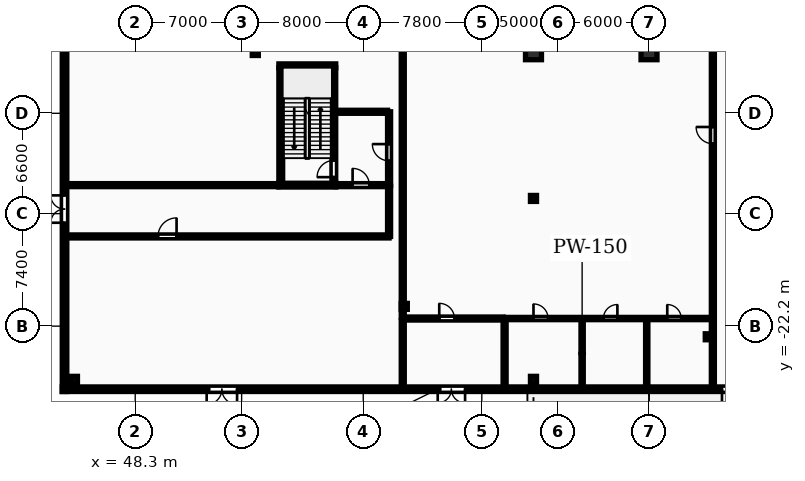
"""IFC4 building model, lengths in metres.
Left out: names, types, materials, properties, quantities, classifications, styles, units other than length and angle.
Written with IfcOpenShell. Run it as: python <this file> out.ifc"""

import sys

from ifc_helpers import new_model, si_unit, direction, frame, frame_2d, origin, origin_2d, place, context, subcontext, project, spatial, rectangle, i_section, extrude, element, fill, save


model = new_model("IFC4")
c1 = context("Model", 3, precision=1e-05, world=origin(), true_north=direction((0.0, 1.0)))
c2 = subcontext(c1, "Body", "Model", "MODEL_VIEW")
j1 = project(units=[si_unit("LENGTHUNIT", "METRE"), si_unit("PLANEANGLEUNIT", "RADIAN")], contexts=[c1])
p1 = place(None, origin())
s1 = spatial("IfcSite", under=j1, at=p1, CompositionType="ELEMENT")
p2 = place(p1, origin())
s2 = spatial("IfcBuilding", under=s1, at=p2, CompositionType="ELEMENT")
p3 = place(p2, origin())
s3 = spatial("IfcBuildingStorey", under=s2, at=p3, CompositionType="ELEMENT", Elevation=0.0)
for number, where, z_axis, x_axis in (
    (1, (74.5, -4.2, 0.0), (0.0, 0.0, 1.0), (1.0, 0.0, 0.0)),
    (2, (82.1, -4.2, 0.0), (0.0, 0.0, 1.0), (1.0, 0.0, 0.0)),
):
    element("IfcColumn", number, at=place(p3, frame(where, z_axis=z_axis, x_axis=x_axis)), inside=s3, PredefinedType="COLUMN", context=c2, shape_type="SweptSolid", body=[
        extrude(rectangle(XDim=1.05, YDim=0.95, at=origin_2d()), origin(), (0.0, 0.0, 1.0), 5.4),
    ])
for number, where, z_axis, x_axis in (
    (3, (56.2, -4.2, 0.0), (0.0, 0.0, 1.0), (1.0, 0.0, 0.0)),
    (4, (74.5, -13.8, 0.0), (0.0, 0.0, 1.0), (1.0, 0.0, 0.0)),
    (5, (86.0, -22.9, 0.0), (0.0, 0.0, 1.0), (1.0, 0.0, 0.0)),
    (6, (66.0, -20.9, 0.0), (0.0, 0.0, 1.0), (1.0, 0.0, 0.0)),
    (7, (44.3, -25.7, 0.0), (0.0, 0.0, 1.0), (1.0, 0.0, 0.0)),
    (8, (74.5, -25.7, 0.0), (0.0, 0.0, 1.0), (1.0, 0.0, 0.0)),
):
    element("IfcColumn", number, at=place(p3, frame(where, z_axis=z_axis, x_axis=x_axis)), inside=s3, PredefinedType="COLUMN", context=c2, shape_type="SweptSolid", body=[
        extrude(i_section(OverallWidth=0.399, OverallDepth=0.394, WebThickness=0.023, FlangeThickness=0.037, FilletRadius=0.015, at=origin_2d()), origin(), (0.0, 0.0, 1.0), 5.4),
    ])
p4 = place(p3, frame((43.5, -26.35, 0.0), z_axis=(0.0, 0.0, 1.0), x_axis=(1.0, 0.0, 0.0)))
e9 = element("IfcWall", 9, at=p4, inside=s3, PredefinedType="STANDARD", context=c2, shape_type="SweptSolid", body=[
    extrude(rectangle(XDim=46.0, YDim=0.3, at=frame_2d((23.0, 0.0))), origin(), (0.0, 0.0, 1.0), 5.1),
])
p5 = place(p4, frame((9.5, 0.0, 0.0)))
e10 = element("IfcOpeningElement", 10, at=p5, cuts=e9, PredefinedType="OPENING", context=c2, shape_type="SweptSolid", body=[
    extrude(rectangle(XDim=2.0, YDim=2.6, at=frame_2d((1.0, 1.3))), frame((0.0, 0.16, 0.0), z_axis=(0.0, -1.0, 0.0), x_axis=(1.0, 0.0, 0.0)), (0.0, 0.0, 1.0), 0.32),
])
p6 = place(p4, frame((24.7, 0.0, 0.0)))
e11 = element("IfcOpeningElement", 11, at=p6, cuts=e9, PredefinedType="OPENING", context=c2, shape_type="SweptSolid", body=[
    extrude(rectangle(XDim=1.8, YDim=2.2, at=frame_2d((0.9, 1.1))), frame((0.0, 0.16, 0.0), z_axis=(0.0, -1.0, 0.0), x_axis=(1.0, 0.0, 0.0)), (0.0, 0.0, 1.0), 0.32),
])
p7 = place(p4, frame((43.4, 0.0, 0.0)))
e12 = element("IfcOpeningElement", 12, at=p7, cuts=e9, PredefinedType="OPENING", context=c2, shape_type="SweptSolid", body=[
    extrude(rectangle(XDim=1.8, YDim=2.2, at=frame_2d((0.9, 1.1))), frame((0.0, 0.16, 0.0), z_axis=(0.0, -1.0, 0.0), x_axis=(1.0, 0.0, 0.0)), (0.0, 0.0, 1.0), 0.32),
])
p8 = place(p3, frame((43.65, 109.2, 0.0), z_axis=(0.0, 0.0, 1.0), x_axis=(0.0, -1.0, 0.0)))
e13 = element("IfcWall", 13, at=p8, inside=s3, PredefinedType="STANDARD", context=c2, shape_type="SweptSolid", body=[
    extrude(rectangle(XDim=135.7, YDim=0.3, at=frame_2d((67.85, 0.0))), origin(), (0.0, 0.0, 1.0), 5.1),
])
p9 = place(p8, frame((75.1, 0.0, 0.0)))
e14 = element("IfcOpeningElement", 14, at=p9, cuts=e13, PredefinedType="OPENING", context=c2, shape_type="SweptSolid", body=[
    extrude(rectangle(XDim=1.8, YDim=2.2, at=frame_2d((0.9, 1.1))), frame((0.0, 0.16, 0.0), z_axis=(0.0, -1.0, 0.0), x_axis=(1.0, 0.0, 0.0)), (0.0, 0.0, 1.0), 0.32),
])
p10 = place(p8, frame((28.1, 0.0, 0.0)))
e15 = element("IfcOpeningElement", 15, at=p10, cuts=e13, PredefinedType="OPENING", context=c2, shape_type="SweptSolid", body=[
    extrude(rectangle(XDim=1.8, YDim=2.2, at=frame_2d((0.9, 1.1))), frame((0.0, 0.16, 0.0), z_axis=(0.0, -1.0, 0.0), x_axis=(1.0, 0.0, 0.0)), (0.0, 0.0, 1.0), 0.32),
])
p11 = place(p8, frame((36.0, 0.0, 0.0)))
e16 = element("IfcOpeningElement", 16, at=p11, cuts=e13, PredefinedType="OPENING", context=c2, shape_type="SweptSolid", body=[
    extrude(rectangle(XDim=2.0, YDim=2.6, at=frame_2d((1.0, 1.3))), frame((0.0, 0.16, 0.0), z_axis=(0.0, -1.0, 0.0), x_axis=(1.0, 0.0, 0.0)), (0.0, 0.0, 1.0), 0.32),
])
p12 = place(p8, frame((48.0, 0.0, 0.0)))
e17 = element("IfcOpeningElement", 17, at=p12, cuts=e13, PredefinedType="OPENING", context=c2, shape_type="SweptSolid", body=[
    extrude(rectangle(XDim=1.8, YDim=2.2, at=frame_2d((0.9, 1.1))), frame((0.0, 0.16, 0.0), z_axis=(0.0, -1.0, 0.0), x_axis=(1.0, 0.0, 0.0)), (0.0, 0.0, 1.0), 0.32),
])
p13 = place(p8, frame((122.8, 0.0, 0.0)))
e18 = element("IfcOpeningElement", 18, at=p13, cuts=e13, PredefinedType="OPENING", context=c2, shape_type="SweptSolid", body=[
    extrude(rectangle(XDim=1.8, YDim=2.2, at=frame_2d((0.9, 1.1))), frame((0.0, 0.16, 0.0), z_axis=(0.0, -1.0, 0.0), x_axis=(1.0, 0.0, 0.0)), (0.0, 0.0, 1.0), 0.32),
])
p14 = place(p3, frame((57.875, -12.8, 0.0), z_axis=(0.0, 0.0, 1.0), x_axis=(0.0, 1.0, 0.0)))
e19 = element("IfcWall", 19, at=p14, inside=s3, PredefinedType="SHEAR", context=c2, shape_type="SweptSolid", body=[
    extrude(rectangle(XDim=7.6, YDim=0.25, at=frame_2d((3.8, 0.0))), origin(), (0.0, 0.0, 1.0), 5.4),
])
for number, where, z_axis, x_axis in (
    (20, (57.75, -12.925, 0.0), (0.0, 0.0, 1.0), (1.0, 0.0, 0.0)),
    (21, (57.75, -5.075, 0.0), (0.0, 0.0, 1.0), (1.0, 0.0, 0.0)),
):
    element("IfcWall", number, at=place(p3, frame(where, z_axis=z_axis, x_axis=x_axis)), inside=s3, PredefinedType="SHEAR", context=c2, shape_type="SweptSolid", body=[
        extrude(rectangle(XDim=3.74, YDim=0.25, at=frame_2d((1.87, 0.0))), origin(), (0.0, 0.0, 1.0), 5.4),
    ])
p15 = place(p3, frame((61.365, -12.8, 0.0), z_axis=(0.0, 0.0, 1.0), x_axis=(0.0, 1.0, 0.0)))
e22 = element("IfcWall", 22, at=p15, inside=s3, PredefinedType="SHEAR", context=c2, shape_type="SweptSolid", body=[
    extrude(rectangle(XDim=7.6, YDim=0.25, at=frame_2d((3.8, 0.0))), origin(), (0.0, 0.0, 1.0), 5.4),
])
p16 = place(p15, frame((0.4, 0.0, 0.0)))
e23 = element("IfcOpeningElement", 23, at=p16, cuts=e22, PredefinedType="OPENING", context=c2, shape_type="SweptSolid", body=[
    extrude(rectangle(XDim=1.1, YDim=2.1, at=frame_2d((0.55, 1.05))), frame((0.0, 0.135, 0.0), z_axis=(0.0, -1.0, 0.0), x_axis=(1.0, 0.0, 0.0)), (0.0, 0.0, 1.0), 0.27),
])
p17 = place(p3, frame((65.0, -12.925, 0.0), z_axis=(0.0, 0.0, 1.0), x_axis=(0.0, 1.0, 0.0)))
e24 = element("IfcWall", 24, at=p17, inside=s3, PredefinedType="PARTITIONING", context=c2, shape_type="SweptSolid", body=[
    extrude(rectangle(XDim=4.825, YDim=0.2, at=frame_2d((2.413, 0.0))), origin(), (0.0, 0.0, 1.0), 5.1),
])
p18 = place(p17, frame((1.6, 0.0, 0.0)))
e25 = element("IfcOpeningElement", 25, at=p18, cuts=e24, PredefinedType="OPENING", context=c2, shape_type="SweptSolid", body=[
    extrude(rectangle(XDim=1.1, YDim=2.15, at=frame_2d((0.55, 1.075))), frame((0.0, 0.11, 0.0), z_axis=(0.0, -1.0, 0.0), x_axis=(1.0, 0.0, 0.0)), (0.0, 0.0, 1.0), 0.22),
])
p19 = place(p3, frame((61.5, -12.925, 0.0), z_axis=(0.0, 0.0, 1.0), x_axis=(1.0, 0.0, 0.0)))
e26 = element("IfcWall", 26, at=p19, inside=s3, PredefinedType="PARTITIONING", context=c2, shape_type="SweptSolid", body=[
    extrude(rectangle(XDim=3.4, YDim=0.2, at=frame_2d((1.7, 0.0))), origin(), (0.0, 0.0, 1.0), 5.1),
])
p20 = place(p19, frame((1.1, 0.0, 0.0)))
e27 = element("IfcOpeningElement", 27, at=p20, cuts=e26, PredefinedType="OPENING", context=c2, shape_type="SweptSolid", body=[
    extrude(rectangle(XDim=1.1, YDim=2.1, at=frame_2d((0.55, 1.05))), frame((0.0, 0.11, 0.0), z_axis=(0.0, -1.0, 0.0), x_axis=(1.0, 0.0, 0.0)), (0.0, 0.0, 1.0), 0.22),
])
p21 = place(p3, frame((61.5, -8.1, 0.0), z_axis=(0.0, 0.0, 1.0), x_axis=(1.0, 0.0, 0.0)))
e28 = element("IfcWall", 28, at=p21, inside=s3, PredefinedType="PARTITIONING", context=c2, shape_type="SweptSolid", body=[
    extrude(rectangle(XDim=3.4, YDim=0.2, at=frame_2d((1.7, 0.0))), origin(), (0.0, 0.0, 1.0), 5.1),
])
p22 = place(p3, frame((65.9, -21.7, 0.0), z_axis=(0.0, 0.0, 1.0), x_axis=(1.0, 0.0, 0.0)))
e29 = element("IfcWall", 29, at=p22, inside=s3, PredefinedType="PARTITIONING", context=c2, shape_type="SweptSolid", body=[
    extrude(rectangle(XDim=6.6, YDim=0.2, at=frame_2d((3.3, 0.0))), origin(), (0.0, 0.0, 1.0), 5.1),
])
p23 = place(p22, frame((2.4, 0.0, 0.0)))
e30 = element("IfcOpeningElement", 30, at=p23, cuts=e29, PredefinedType="OPENING", context=c2, shape_type="SweptSolid", body=[
    extrude(rectangle(XDim=1.0, YDim=2.1, at=frame_2d((0.5, 1.05))), frame((0.0, 0.11, 0.0), z_axis=(0.0, -1.0, 0.0), x_axis=(1.0, 0.0, 0.0)), (0.0, 0.0, 1.0), 0.22),
])
for number, where, z_axis, x_axis in (
    (31, (65.9, -26.2, 0.0), (0.0, 0.0, 1.0), (0.0, 1.0, 0.0)),
    (32, (72.6, -26.2, 0.0), (0.0, 0.0, 1.0), (0.0, 1.0, 0.0)),
):
    element("IfcWall", number, at=place(p3, frame(where, z_axis=z_axis, x_axis=x_axis)), inside=s3, PredefinedType="PARTITIONING", context=c2, shape_type="SweptSolid", body=[
        extrude(rectangle(XDim=4.35, YDim=0.2, at=frame_2d((2.175, 0.0))), origin(), (0.0, 0.0, 1.0), 5.1),
    ])
p24 = place(p3, frame((86.3, -26.2, 0.0), z_axis=(0.0, 0.0, 1.0), x_axis=(0.0, 1.0, 0.0)))
e33 = element("IfcWall", 33, at=p24, inside=s3, PredefinedType="PARTITIONING", context=c2, shape_type="SweptSolid", body=[
    extrude(rectangle(XDim=44.35, YDim=0.2, at=frame_2d((22.175, 0.0))), origin(), (0.0, 0.0, 1.0), 5.1),
])
p25 = place(p24, frame((16.0, 0.0, 0.0)))
e34 = element("IfcOpeningElement", 34, at=p25, cuts=e33, PredefinedType="OPENING", context=c2, shape_type="SweptSolid", body=[
    extrude(rectangle(XDim=1.1, YDim=2.1, at=frame_2d((0.55, 1.05))), frame((0.0, 0.11, 0.0), z_axis=(0.0, -1.0, 0.0), x_axis=(1.0, 0.0, 0.0)), (0.0, 0.0, 1.0), 0.22),
])
p26 = place(p3, frame((43.8, -16.3, 0.0), z_axis=(0.0, 0.0, 1.0), x_axis=(1.0, 0.0, 0.0)))
e35 = element("IfcWall", 35, at=p26, inside=s3, PredefinedType="PARTITIONING", context=c2, shape_type="SweptSolid", body=[
    extrude(rectangle(XDim=21.2, YDim=0.2, at=frame_2d((10.6, 0.0))), origin(), (0.0, 0.0, 1.0), 5.1),
])
p27 = place(p26, frame((6.0, 0.0, 0.0)))
e36 = element("IfcOpeningElement", 36, at=p27, cuts=e35, PredefinedType="OPENING", context=c2, shape_type="SweptSolid", body=[
    extrude(rectangle(XDim=1.22, YDim=2.18, at=frame_2d((0.61, 1.09))), frame((0.0, 0.11, 0.0), z_axis=(0.0, -1.0, 0.0), x_axis=(1.0, 0.0, 0.0)), (0.0, 0.0, 1.0), 0.22),
])
p28 = place(p3, frame((43.8, -12.925, 0.0), z_axis=(0.0, 0.0, 1.0), x_axis=(1.0, 0.0, 0.0)))
e37 = element("IfcWall", 37, at=p28, inside=s3, PredefinedType="PARTITIONING", context=c2, shape_type="SweptSolid", body=[
    extrude(rectangle(XDim=13.9, YDim=0.2, at=frame_2d((6.95, 0.0))), origin(), (0.0, 0.0, 1.0), 5.1),
])
p29 = place(p3, frame((65.0, -16.3, 0.0), z_axis=(0.0, 0.0, 1.0), x_axis=(0.0, 1.0, 0.0)))
e38 = element("IfcWall", 38, at=p29, inside=s3, PredefinedType="PARTITIONING", context=c2, shape_type="SweptSolid", body=[
    extrude(rectangle(XDim=3.3, YDim=0.2, at=frame_2d((1.65, 0.0))), origin(), (0.0, 0.0, 1.0), 5.1),
])
p30 = place(p3, frame((72.7, -21.7, 0.0), z_axis=(0.0, 0.0, 1.0), x_axis=(1.0, 0.0, 0.0)))
e39 = element("IfcWall", 39, at=p30, inside=s3, PredefinedType="PARTITIONING", context=c2, shape_type="SweptSolid", body=[
    extrude(rectangle(XDim=13.5, YDim=0.15, at=frame_2d((6.75, 0.0))), origin(), (0.0, 0.0, 1.0), 5.1),
])
p31 = place(p30, frame((1.8, 0.0, 0.0)))
e40 = element("IfcOpeningElement", 40, at=p31, cuts=e39, PredefinedType="OPENING", context=c2, shape_type="SweptSolid", body=[
    extrude(rectangle(XDim=0.96, YDim=2.1, at=frame_2d((0.48, 1.05))), frame((0.0, 0.085, 0.0), z_axis=(0.0, -1.0, 0.0), x_axis=(1.0, 0.0, 0.0)), (0.0, 0.0, 1.0), 0.17),
])
p32 = place(p30, frame((6.4, 0.0, 0.0)))
e41 = element("IfcOpeningElement", 41, at=p32, cuts=e39, PredefinedType="OPENING", context=c2, shape_type="SweptSolid", body=[
    extrude(rectangle(XDim=0.92, YDim=2.08, at=frame_2d((0.46, 1.04))), frame((0.0, 0.085, 0.0), z_axis=(0.0, -1.0, 0.0), x_axis=(1.0, 0.0, 0.0)), (0.0, 0.0, 1.0), 0.17),
])
p33 = place(p30, frame((10.6, 0.0, 0.0)))
e42 = element("IfcOpeningElement", 42, at=p33, cuts=e39, PredefinedType="OPENING", context=c2, shape_type="SweptSolid", body=[
    extrude(rectangle(XDim=0.92, YDim=2.08, at=frame_2d((0.46, 1.04))), frame((0.0, 0.085, 0.0), z_axis=(0.0, -1.0, 0.0), x_axis=(1.0, 0.0, 0.0)), (0.0, 0.0, 1.0), 0.17),
])
for number, where, z_axis, x_axis in (
    (43, (77.7, -26.2, 0.0), (0.0, 0.0, 1.0), (0.0, 1.0, 0.0)),
    (44, (81.95, -26.2, 0.0), (0.0, 0.0, 1.0), (0.0, 1.0, 0.0)),
):
    element("IfcWall", number, at=place(p3, frame(where, z_axis=z_axis, x_axis=x_axis)), inside=s3, PredefinedType="PARTITIONING", context=c2, shape_type="SweptSolid", body=[
        extrude(rectangle(XDim=4.4, YDim=0.15, at=frame_2d((2.2, 0.0))), origin(), (0.0, 0.0, 1.0), 5.1),
    ])
p34 = place(p3, frame((65.9, -21.6, 0.0), z_axis=(0.0, 0.0, 1.0), x_axis=(0.0, 1.0, 0.0)))
e45 = element("IfcWall", 45, at=p34, inside=s3, PredefinedType="PARTITIONING", context=c2, shape_type="SweptSolid", body=[
    extrude(rectangle(XDim=53.15, YDim=0.2, at=frame_2d((26.575, 0.0))), origin(), (0.0, 0.0, 1.0), 5.1),
])
p35 = place(p34, frame((22.0, 0.0, 0.0)))
e46 = element("IfcOpeningElement", 46, at=p35, cuts=e45, PredefinedType="OPENING", context=c2, shape_type="SweptSolid", body=[
    extrude(rectangle(XDim=1.22, YDim=2.18, at=frame_2d((0.61, 1.09))), frame((0.0, 0.11, 0.0), z_axis=(0.0, -1.0, 0.0), x_axis=(1.0, 0.0, 0.0)), (0.0, 0.0, 1.0), 0.22),
])
p36 = place(p5, frame((2.0, 0.0, 0.0), z_axis=(0.0, 0.0, 1.0), x_axis=(-1.0, 0.0, 0.0)))
e47 = element("IfcDoor", 47, at=p36, inside=s3, OperationType="DOUBLE_DOOR_SINGLE_SWING", PredefinedType="DOOR", context=c2, shape_type="SweptSolid", body=[
    extrude(rectangle(XDim=2.0, YDim=2.6, at=frame_2d((1.0, 1.3))), frame((0.0, 0.025, 0.0), z_axis=(0.0, -1.0, 0.0), x_axis=(1.0, 0.0, 0.0)), (0.0, 0.0, 1.0), 0.05),
])
fill(e10, e47)
p37 = place(p6, frame((1.8, 0.0, 0.0), z_axis=(0.0, 0.0, 1.0), x_axis=(-1.0, 0.0, 0.0)))
e48 = element("IfcDoor", 48, at=p37, inside=s3, OperationType="DOUBLE_DOOR_SINGLE_SWING", PredefinedType="DOOR", context=c2, shape_type="SweptSolid", body=[
    extrude(rectangle(XDim=1.8, YDim=2.2, at=frame_2d((0.9, 1.1))), frame((0.0, 0.025, 0.0), z_axis=(0.0, -1.0, 0.0), x_axis=(1.0, 0.0, 0.0)), (0.0, 0.0, 1.0), 0.05),
])
fill(e11, e48)
p38 = place(p7, frame((1.8, 0.0, 0.0), z_axis=(0.0, 0.0, 1.0), x_axis=(-1.0, 0.0, 0.0)))
e49 = element("IfcDoor", 49, at=p38, inside=s3, OperationType="DOUBLE_DOOR_SINGLE_SWING", PredefinedType="DOOR", context=c2, shape_type="SweptSolid", body=[
    extrude(rectangle(XDim=1.8, YDim=2.2, at=frame_2d((0.9, 1.1))), frame((0.0, 0.025, 0.0), z_axis=(0.0, -1.0, 0.0), x_axis=(1.0, 0.0, 0.0)), (0.0, 0.0, 1.0), 0.05),
])
fill(e12, e49)
p39 = place(p13, frame((1.8, 0.0, 0.0), z_axis=(0.0, 0.0, 1.0), x_axis=(-1.0, 0.0, 0.0)))
e50 = element("IfcDoor", 50, at=p39, inside=s3, OperationType="DOUBLE_DOOR_SINGLE_SWING", PredefinedType="DOOR", context=c2, shape_type="SweptSolid", body=[
    extrude(rectangle(XDim=1.8, YDim=2.2, at=frame_2d((0.9, 1.1))), frame((0.0, 0.025, 0.0), z_axis=(0.0, -1.0, 0.0), x_axis=(1.0, 0.0, 0.0)), (0.0, 0.0, 1.0), 0.05),
])
fill(e18, e50)
p40 = place(p16, origin())
e51 = element("IfcDoor", 51, at=p40, inside=s3, OperationType="SINGLE_SWING_LEFT", PredefinedType="DOOR", context=c2, shape_type="SweptSolid", body=[
    extrude(rectangle(XDim=1.1, YDim=2.1, at=frame_2d((0.55, 1.05))), frame((0.0, 0.025, 0.0), z_axis=(0.0, -1.0, 0.0), x_axis=(1.0, 0.0, 0.0)), (0.0, 0.0, 1.0), 0.05),
])
fill(e23, e51)
p41 = place(p18, origin())
e52 = element("IfcDoor", 52, at=p41, inside=s3, OperationType="SINGLE_SWING_RIGHT", PredefinedType="DOOR", context=c2, shape_type="SweptSolid", body=[
    extrude(rectangle(XDim=1.1, YDim=2.15, at=frame_2d((0.55, 1.075))), frame((0.0, 0.025, 0.0), z_axis=(0.0, -1.0, 0.0), x_axis=(1.0, 0.0, 0.0)), (0.0, 0.0, 1.0), 0.05),
])
fill(e25, e52)
p42 = place(p20, origin())
e53 = element("IfcDoor", 53, at=p42, inside=s3, OperationType="SINGLE_SWING_LEFT", PredefinedType="DOOR", context=c2, shape_type="SweptSolid", body=[
    extrude(rectangle(XDim=1.1, YDim=2.1, at=frame_2d((0.55, 1.05))), frame((0.0, 0.025, 0.0), z_axis=(0.0, -1.0, 0.0), x_axis=(1.0, 0.0, 0.0)), (0.0, 0.0, 1.0), 0.05),
])
fill(e27, e53)
p43 = place(p23, origin())
e54 = element("IfcDoor", 54, at=p43, inside=s3, OperationType="SINGLE_SWING_LEFT", PredefinedType="DOOR", context=c2, shape_type="SweptSolid", body=[
    extrude(rectangle(XDim=1.0, YDim=2.1, at=frame_2d((0.5, 1.05))), frame((0.0, 0.025, 0.0), z_axis=(0.0, -1.0, 0.0), x_axis=(1.0, 0.0, 0.0)), (0.0, 0.0, 1.0), 0.05),
])
fill(e30, e54)
p44 = place(p25, origin())
e55 = element("IfcDoor", 55, at=p44, inside=s3, OperationType="SINGLE_SWING_RIGHT", PredefinedType="DOOR", context=c2, shape_type="SweptSolid", body=[
    extrude(rectangle(XDim=1.1, YDim=2.1, at=frame_2d((0.55, 1.05))), frame((0.0, 0.025, 0.0), z_axis=(0.0, -1.0, 0.0), x_axis=(1.0, 0.0, 0.0)), (0.0, 0.0, 1.0), 0.05),
])
fill(e34, e55)
p45 = place(p27, origin())
e56 = element("IfcDoor", 56, at=p45, inside=s3, OperationType="SINGLE_SWING_RIGHT", PredefinedType="DOOR", context=c2, shape_type="SweptSolid", body=[
    extrude(rectangle(XDim=1.22, YDim=2.18, at=frame_2d((0.61, 1.09))), frame((0.0, 0.025, 0.0), z_axis=(0.0, -1.0, 0.0), x_axis=(1.0, 0.0, 0.0)), (0.0, 0.0, 1.0), 0.05),
])
fill(e36, e56)
p46 = place(p31, origin())
e57 = element("IfcDoor", 57, at=p46, inside=s3, OperationType="SINGLE_SWING_LEFT", PredefinedType="DOOR", context=c2, shape_type="SweptSolid", body=[
    extrude(rectangle(XDim=0.96, YDim=2.1, at=frame_2d((0.48, 1.05))), frame((0.0, 0.025, 0.0), z_axis=(0.0, -1.0, 0.0), x_axis=(1.0, 0.0, 0.0)), (0.0, 0.0, 1.0), 0.05),
])
fill(e40, e57)
p47 = place(p32, origin())
e58 = element("IfcDoor", 58, at=p47, inside=s3, OperationType="SINGLE_SWING_RIGHT", PredefinedType="DOOR", context=c2, shape_type="SweptSolid", body=[
    extrude(rectangle(XDim=0.92, YDim=2.08, at=frame_2d((0.46, 1.04))), frame((0.0, 0.025, 0.0), z_axis=(0.0, -1.0, 0.0), x_axis=(1.0, 0.0, 0.0)), (0.0, 0.0, 1.0), 0.05),
])
fill(e41, e58)
p48 = place(p33, origin())
e59 = element("IfcDoor", 59, at=p48, inside=s3, OperationType="SINGLE_SWING_LEFT", PredefinedType="DOOR", context=c2, shape_type="SweptSolid", body=[
    extrude(rectangle(XDim=0.92, YDim=2.08, at=frame_2d((0.46, 1.04))), frame((0.0, 0.025, 0.0), z_axis=(0.0, -1.0, 0.0), x_axis=(1.0, 0.0, 0.0)), (0.0, 0.0, 1.0), 0.05),
])
fill(e42, e59)
save(model, sys.argv[1])
